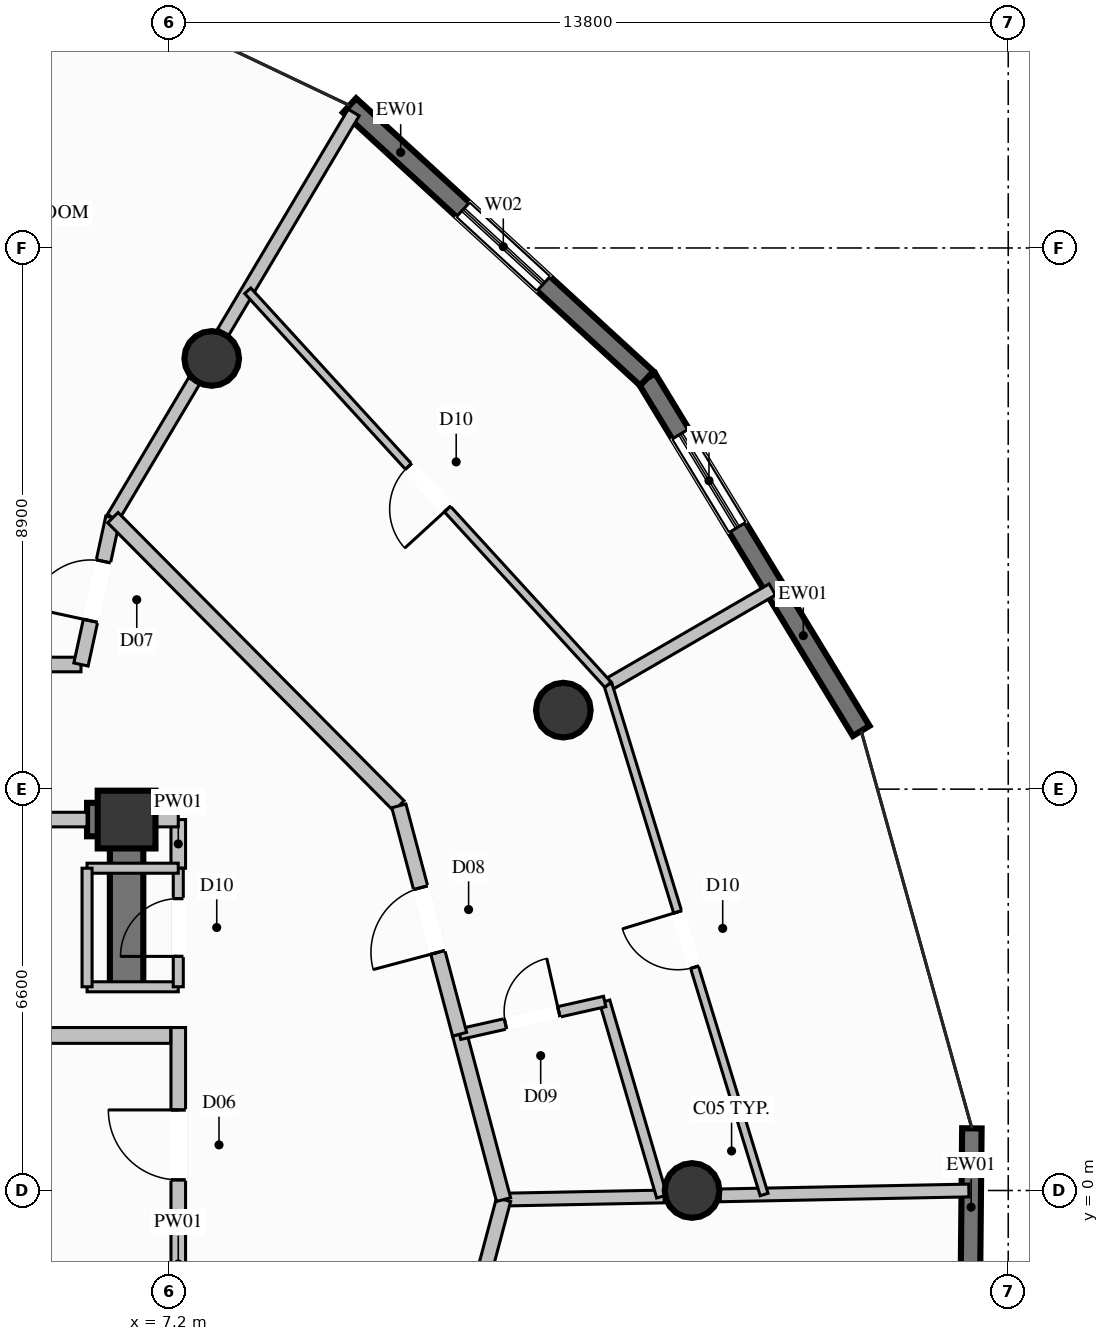
"""IFC4 building model, lengths in metres.
Left out: names, types, materials, properties, quantities, classifications, styles, units other than length and angle.
Written with IfcOpenShell. Run it as: python <this file> out.ifc"""

import sys

from ifc_helpers import new_model, si_unit, direction, frame, frame_2d, origin, origin_2d, place, context, subcontext, project, spatial, rectangle, circle, extrude, element, fill, save


model = new_model("IFC4")
c1 = context("Model", 3, precision=1e-05, world=origin(), true_north=direction((0.0, 1.0)))
c2 = subcontext(c1, "Body", "Model", "MODEL_VIEW")
j1 = project(units=[si_unit("LENGTHUNIT", "METRE"), si_unit("PLANEANGLEUNIT", "RADIAN")], contexts=[c1])
p1 = place(None, origin())
s1 = spatial("IfcSite", under=j1, at=p1, CompositionType="ELEMENT")
p2 = place(p1, origin())
s2 = spatial("IfcBuilding", under=s1, at=p2, CompositionType="ELEMENT")
p3 = place(p2, frame((0.0, 0.0, 209.2)))
s3 = spatial("IfcBuildingStorey", under=s2, at=p3, CompositionType="ELEMENT", Elevation=209.2)
p4 = place(p3, frame((6.5, 6.1, 0.0), z_axis=(0.0, 0.0, 1.0), x_axis=(1.0, 0.0, 0.0)))
e1 = element("IfcColumn", 1, at=p4, inside=s3, PredefinedType="COLUMN", context=c2, shape_type="SweptSolid", body=[
    extrude(rectangle(XDim=0.95, YDim=0.95, at=origin_2d()), origin(), (0.0, 0.0, 1.0), 3.6),
])
p5 = place(p3, frame((5.85, 6.1, 0.0), z_axis=(0.0, 0.0, 1.0), x_axis=(1.0, 0.0, 0.0)))
e2 = element("IfcWall", 2, at=p5, inside=s3, PredefinedType="SHEAR", context=c2, shape_type="SweptSolid", body=[
    extrude(rectangle(XDim=0.375, YDim=0.55, at=frame_2d((0.188, 0.0))), origin(), (0.0, 0.0, 1.0), 3.6),
])
p6 = place(p3, frame((6.5, 3.35, 0.0), z_axis=(0.0, 0.0, 1.0), x_axis=(0.0, 1.0, 0.0)))
e3 = element("IfcWall", 3, at=p6, inside=s3, PredefinedType="SHEAR", context=c2, shape_type="SweptSolid", body=[
    extrude(rectangle(XDim=3.025, YDim=0.55, at=frame_2d((1.512, 0.0))), origin(), (0.0, 0.0, 1.0), 3.6),
])
for number, where, z_axis, x_axis in (
    (4, (15.8, 0.0, 0.0), (0.0, 0.0, 1.0), (1.0, 0.0, 0.0)),
    (5, (13.683, 7.9, 0.0), (0.0, 0.0, 1.0), (1.0, 0.0, 0.0)),
    (6, (7.9, 13.683, 0.0), (0.0, 0.0, 1.0), (1.0, 0.0, 0.0)),
):
    element("IfcColumn", number, at=place(p3, frame(where, z_axis=z_axis, x_axis=x_axis)), inside=s3, PredefinedType="COLUMN", context=c2, shape_type="SweptSolid", body=[
        extrude(circle(Radius=0.45, at=origin_2d()), origin(), (0.0, 0.0, 1.0), 3.6),
    ])
p7 = place(p3, frame((20.402, 1.022, 0.0), z_axis=(0.0, 0.0, 1.0), x_axis=(-0.009674000115, -0.999953205766, 0.0)))
e7 = element("IfcWall", 7, at=p7, inside=s3, PredefinedType="SOLIDWALL", context=c2, shape_type="SweptSolid", body=[
    extrude(rectangle(XDim=6.637, YDim=0.32, at=frame_2d((3.319, 0.0))), origin(), (0.0, 0.0, 1.0), 3.36),
])
p8 = place(p7, frame((2.843, 0.0, 0.35)))
e8 = element("IfcOpeningElement", 8, at=p8, cuts=e7, PredefinedType="OPENING", context=c2, shape_type="SweptSolid", body=[
    extrude(rectangle(XDim=1.8, YDim=2.6, at=frame_2d((0.9, 1.3))), frame((0.0, 0.17, 0.0), z_axis=(0.0, -1.0, 0.0), x_axis=(1.0, 0.0, 0.0)), (0.0, 0.0, 1.0), 0.34),
])
p9 = place(p3, frame((15.055, 13.355, 0.0), z_axis=(0.0, 0.0, 1.0), x_axis=(0.519792847808, -0.854292336011, 0.0)))
e9 = element("IfcWall", 9, at=p9, inside=s3, PredefinedType="SOLIDWALL", context=c2, shape_type="SweptSolid", body=[
    extrude(rectangle(XDim=6.786, YDim=0.32, at=frame_2d((3.393, 0.0))), origin(), (0.0, 0.0, 1.0), 3.36),
])
p10 = place(p9, frame((1.069, 0.0, 0.35)))
e10 = element("IfcOpeningElement", 10, at=p10, cuts=e9, PredefinedType="OPENING", context=c2, shape_type="SweptSolid", body=[
    extrude(rectangle(XDim=1.8, YDim=2.6, at=frame_2d((0.9, 1.3))), frame((0.0, 0.17, 0.0), z_axis=(0.0, -1.0, 0.0), x_axis=(1.0, 0.0, 0.0)), (0.0, 0.0, 1.0), 0.34),
])
p11 = place(p3, frame((10.167, 17.844, 0.0), z_axis=(0.0, 0.0, 1.0), x_axis=(0.736523155924, -0.676412330452, 0.0)))
e11 = element("IfcWall", 11, at=p11, inside=s3, PredefinedType="SOLIDWALL", context=c2, shape_type="SweptSolid", body=[
    extrude(rectangle(XDim=6.636, YDim=0.32, at=frame_2d((3.318, 0.0))), origin(), (0.0, 0.0, 1.0), 3.36),
])
p12 = place(p11, frame((2.533, 0.0, 0.35)))
e12 = element("IfcOpeningElement", 12, at=p12, cuts=e11, PredefinedType="OPENING", context=c2, shape_type="SweptSolid", body=[
    extrude(rectangle(XDim=1.8, YDim=2.6, at=frame_2d((0.9, 1.3))), frame((0.0, 0.17, 0.0), z_axis=(0.0, -1.0, 0.0), x_axis=(1.0, 0.0, 0.0)), (0.0, 0.0, 1.0), 0.34),
])
p13 = place(p3, frame((7.35, -2.34, 0.0), z_axis=(0.0, 0.0, 1.0), x_axis=(0.0, 1.0, 0.0)))
e13 = element("IfcWall", 13, at=p13, inside=s3, PredefinedType="PARTITIONING", context=c2, shape_type="SweptSolid", body=[
    extrude(rectangle(XDim=5.02, YDim=0.24, at=frame_2d((2.51, 0.0))), origin(), (0.0, 0.0, 1.0), 2.445),
])
p14 = place(p13, frame((2.515, 0.0, 0.0)))
e14 = element("IfcOpeningElement", 14, at=p14, cuts=e13, PredefinedType="OPENING", context=c2, shape_type="SweptSolid", body=[
    extrude(rectangle(XDim=1.15, YDim=2.2, at=frame_2d((0.575, 1.1))), frame((0.0, 0.13, 0.0), z_axis=(0.0, -1.0, 0.0), x_axis=(1.0, 0.0, 0.0)), (0.0, 0.0, 1.0), 0.26),
])
p15 = place(p3, frame((4.13, 2.55, 0.0), z_axis=(0.0, 0.0, 1.0), x_axis=(1.0, 0.0, 0.0)))
e15 = element("IfcWall", 15, at=p15, inside=s3, PredefinedType="PARTITIONING", context=c2, shape_type="SweptSolid", body=[
    extrude(rectangle(XDim=3.095, YDim=0.26, at=frame_2d((1.548, 0.0))), origin(), (0.0, 0.0, 1.0), 3.36),
])
p16 = place(p3, frame((-5.75, 8.65, 0.0), z_axis=(0.0, 0.0, 1.0), x_axis=(1.0, 0.0, 0.0)))
e16 = element("IfcWall", 16, at=p16, inside=s3, PredefinedType="PARTITIONING", context=c2, shape_type="SweptSolid", body=[
    extrude(rectangle(XDim=11.5, YDim=0.24, at=frame_2d((5.75, 0.0))), origin(), (0.0, 0.0, 1.0), 3.36),
])
p17 = place(p3, frame((3.0, 6.1, 0.0), z_axis=(0.0, 0.0, 1.0), x_axis=(1.0, 0.0, 0.0)))
e17 = element("IfcWall", 17, at=p17, inside=s3, PredefinedType="PARTITIONING", context=c2, shape_type="SweptSolid", body=[
    extrude(rectangle(XDim=2.85, YDim=0.24, at=frame_2d((1.425, 0.0))), origin(), (0.0, 0.0, 1.0), 2.445),
])
p18 = place(p3, frame((7.35, 5.3, 0.0), z_axis=(0.0, 0.0, 1.0), x_axis=(0.0, 1.0, 0.0)))
e18 = element("IfcWall", 18, at=p18, inside=s3, PredefinedType="PARTITIONING", context=c2, shape_type="SweptSolid", body=[
    extrude(rectangle(XDim=0.8, YDim=0.24, at=frame_2d((0.4, 0.0))), origin(), (0.0, 0.0, 1.0), 2.445),
])
p19 = place(p3, frame((6.5, 6.1, 0.0), z_axis=(0.0, 0.0, 1.0), x_axis=(1.0, 0.0, 0.0)))
e19 = element("IfcWall", 19, at=p19, inside=s3, PredefinedType="PARTITIONING", context=c2, shape_type="SweptSolid", body=[
    extrude(rectangle(XDim=0.85, YDim=0.24, at=frame_2d((0.425, 0.0))), origin(), (0.0, 0.0, 1.0), 2.801),
])
p20 = place(p3, frame((5.85, 3.35, 0.0), z_axis=(0.0, 0.0, 1.0), x_axis=(1.0, 0.0, 0.0)))
e20 = element("IfcWall", 20, at=p20, inside=s3, PredefinedType="PARTITIONING", context=c2, shape_type="SweptSolid", body=[
    extrude(rectangle(XDim=1.5, YDim=0.165, at=frame_2d((0.75, 0.0))), origin(), (0.0, 0.0, 1.0), 3.36),
])
p21 = place(p3, frame((7.35, 3.35, 0.0), z_axis=(0.0, 0.0, 1.0), x_axis=(0.0, 1.0, 0.0)))
e21 = element("IfcWall", 21, at=p21, inside=s3, PredefinedType="PARTITIONING", context=c2, shape_type="SweptSolid", body=[
    extrude(rectangle(XDim=1.95, YDim=0.165, at=frame_2d((0.975, 0.0))), origin(), (0.0, 0.0, 1.0), 3.36),
])
p22 = place(p21, frame((0.5, 0.0, 0.0)))
e22 = element("IfcOpeningElement", 22, at=p22, cuts=e21, PredefinedType="OPENING", context=c2, shape_type="SweptSolid", body=[
    extrude(rectangle(XDim=0.95, YDim=2.1, at=frame_2d((0.475, 1.05))), frame((0.0, 0.093, 0.0), z_axis=(0.0, -1.0, 0.0), x_axis=(1.0, 0.0, 0.0)), (0.0, 0.0, 1.0), 0.185),
])
p23 = place(p3, frame((7.35, 5.3, 0.0), z_axis=(0.0, 0.0, 1.0), x_axis=(-1.0, 0.0, 0.0)))
e23 = element("IfcWall", 23, at=p23, inside=s3, PredefinedType="PARTITIONING", context=c2, shape_type="SweptSolid", body=[
    extrude(rectangle(XDim=1.5, YDim=0.165, at=frame_2d((0.75, 0.0))), origin(), (0.0, 0.0, 1.0), 2.445),
])
p24 = place(p3, frame((5.85, 5.3, 0.0), z_axis=(0.0, 0.0, 1.0), x_axis=(0.0, -1.0, 0.0)))
e24 = element("IfcWall", 24, at=p24, inside=s3, PredefinedType="PARTITIONING", context=c2, shape_type="SweptSolid", body=[
    extrude(rectangle(XDim=1.95, YDim=0.165, at=frame_2d((0.975, 0.0))), origin(), (0.0, 0.0, 1.0), 2.445),
])
p25 = place(p3, frame((12.7, -0.15, 0.0), z_axis=(0.0, 0.0, 1.0), x_axis=(0.999806076636, 0.019692869828, 0.0)))
e25 = element("IfcWall", 25, at=p25, inside=s3, PredefinedType="PARTITIONING", context=c2, shape_type="SweptSolid", body=[
    extrude(rectangle(XDim=2.641, YDim=0.21, at=frame_2d((1.32, 0.0))), origin(), (0.0, 0.0, 1.0), 3.36),
])
p26 = place(p3, frame((16.263, -0.08, 0.0), z_axis=(0.0, 0.0, 1.0), x_axis=(0.999808303125, 0.019579504653, 0.0)))
e26 = element("IfcWall", 26, at=p26, inside=s3, PredefinedType="PARTITIONING", context=c2, shape_type="SweptSolid", body=[
    extrude(rectangle(XDim=4.09, YDim=0.21, at=frame_2d((2.045, 0.0))), origin(), (0.0, 0.0, 1.0), 3.36),
])
p27 = place(p3, frame((6.275, 11.065, 0.0), z_axis=(0.0, 0.0, 1.0), x_axis=(0.510935579326, 0.859619005013, 0.0)))
e27 = element("IfcWall", 27, at=p27, inside=s3, PredefinedType="PARTITIONING", context=c2, shape_type="SweptSolid", body=[
    extrude(rectangle(XDim=2.615, YDim=0.21, at=frame_2d((1.308, 0.0))), origin(), (0.0, 0.0, 1.0), 2.801),
])
p28 = place(p3, frame((8.087, 14.114, 0.0), z_axis=(0.0, 0.0, 1.0), x_axis=(0.510955957876, 0.859606892196, 0.0)))
e28 = element("IfcWall", 28, at=p28, inside=s3, PredefinedType="PARTITIONING", context=c2, shape_type="SweptSolid", body=[
    extrude(rectangle(XDim=4.204, YDim=0.21, at=frame_2d((2.102, 0.0))), origin(), (0.0, 0.0, 1.0), 3.36),
])
p29 = place(p3, frame((5.75, 8.65, 0.0), z_axis=(0.0, 0.0, 1.0), x_axis=(0.212388632151, 0.977185278713, 0.0)))
e29 = element("IfcWall", 29, at=p29, inside=s3, PredefinedType="PARTITIONING", context=c2, shape_type="SweptSolid", body=[
    extrude(rectangle(XDim=2.471, YDim=0.24, at=frame_2d((1.236, 0.0))), origin(), (0.0, 0.0, 1.0), 3.36),
])
p30 = place(p29, frame((0.736, 0.0, 0.0)))
e30 = element("IfcOpeningElement", 30, at=p30, cuts=e29, PredefinedType="OPENING", context=c2, shape_type="SweptSolid", body=[
    extrude(rectangle(XDim=1.0, YDim=2.2, at=frame_2d((0.5, 1.1))), frame((0.0, 0.13, 0.0), z_axis=(0.0, -1.0, 0.0), x_axis=(1.0, 0.0, 0.0)), (0.0, 0.0, 1.0), 0.26),
])
p31 = place(p3, frame((11.701, -3.906, 0.0), z_axis=(0.0, 0.0, 1.0), x_axis=(0.257037057674, 0.966401547486, 0.0)))
e31 = element("IfcWall", 31, at=p31, inside=s3, PredefinedType="PARTITIONING", context=c2, shape_type="SweptSolid", body=[
    extrude(rectangle(XDim=3.887, YDim=0.24, at=frame_2d((1.943, 0.0))), origin(), (0.0, 0.0, 1.0), 3.36),
])
p32 = place(p31, frame((1.443, 0.0, 0.0)))
e32 = element("IfcOpeningElement", 32, at=p32, cuts=e31, PredefinedType="OPENING", context=c2, shape_type="SweptSolid", body=[
    extrude(rectangle(XDim=1.0, YDim=2.2, at=frame_2d((0.5, 1.1))), frame((0.0, 0.13, 0.0), z_axis=(0.0, -1.0, 0.0), x_axis=(1.0, 0.0, 0.0)), (0.0, 0.0, 1.0), 0.26),
])
p33 = place(p3, frame((12.7, -0.15, 0.0), z_axis=(0.0, 0.0, 1.0), x_axis=(-0.256858081143, 0.966449132729, 0.0)))
e33 = element("IfcWall", 33, at=p33, inside=s3, PredefinedType="PARTITIONING", context=c2, shape_type="SweptSolid", body=[
    extrude(rectangle(XDim=2.814, YDim=0.24, at=frame_2d((1.407, 0.0))), origin(), (0.0, 0.0, 1.0), 3.36),
])
p34 = place(p3, frame((15.302, -0.099, 0.0), z_axis=(0.0, 0.0, 1.0), x_axis=(-0.280987384428, 0.959711461739, 0.0)))
e34 = element("IfcWall", 34, at=p34, inside=s3, PredefinedType="PLUMBINGWALL", context=c2, shape_type="SweptSolid", body=[
    extrude(rectangle(XDim=3.342, YDim=0.175, at=frame_2d((1.671, 0.0))), origin(), (0.0, 0.0, 1.0), 2.929),
])
p35 = place(p3, frame((11.977, 2.57, 0.0), z_axis=(0.0, 0.0, 1.0), x_axis=(0.975522568514, 0.219899336789, 0.0)))
e35 = element("IfcWall", 35, at=p35, inside=s3, PredefinedType="PLUMBINGWALL", context=c2, shape_type="SweptSolid", body=[
    extrude(rectangle(XDim=2.446, YDim=0.175, at=frame_2d((1.223, 0.0))), origin(), (0.0, 0.0, 1.0), 3.36),
])
p36 = place(p35, frame((0.773, 0.0, 0.0)))
e36 = element("IfcOpeningElement", 36, at=p36, cuts=e35, PredefinedType="OPENING", context=c2, shape_type="SweptSolid", body=[
    extrude(rectangle(XDim=0.9, YDim=2.1, at=frame_2d((0.45, 1.05))), frame((0.0, 0.098, 0.0), z_axis=(0.0, -1.0, 0.0), x_axis=(1.0, 0.0, 0.0)), (0.0, 0.0, 1.0), 0.195),
])
p37 = place(p3, frame((14.418, 8.318, 0.0), z_axis=(0.0, 0.0, 1.0), x_axis=(0.865215694167, 0.501399843006, 0.0)))
e37 = element("IfcWall", 37, at=p37, inside=s3, PredefinedType="PARTITIONING", context=c2, shape_type="SweptSolid", body=[
    extrude(rectangle(XDim=3.123, YDim=0.21, at=frame_2d((1.562, 0.0))), origin(), (0.0, 0.0, 1.0), 3.36),
])
p38 = place(p3, frame((10.978, 6.325, 0.0), z_axis=(0.0, 0.0, 1.0), x_axis=(-0.704340920508, 0.709861865223, 0.0)))
e38 = element("IfcWall", 38, at=p38, inside=s3, PredefinedType="PARTITIONING", context=c2, shape_type="SweptSolid", body=[
    extrude(rectangle(XDim=6.677, YDim=0.24, at=frame_2d((3.339, 0.0))), origin(), (0.0, 0.0, 1.0), 3.36),
])
p39 = place(p3, frame((11.977, 2.57, 0.0), z_axis=(0.0, 0.0, 1.0), x_axis=(-0.257115096486, 0.966380787867, 0.0)))
e39 = element("IfcWall", 39, at=p39, inside=s3, PredefinedType="PARTITIONING", context=c2, shape_type="SweptSolid", body=[
    extrude(rectangle(XDim=3.885, YDim=0.24, at=frame_2d((1.943, 0.0))), origin(), (0.0, 0.0, 1.0), 3.36),
])
p40 = place(p39, frame((1.393, 0.0, 0.0)))
e40 = element("IfcOpeningElement", 40, at=p40, cuts=e39, PredefinedType="OPENING", context=c2, shape_type="SweptSolid", body=[
    extrude(rectangle(XDim=1.1, YDim=2.3, at=frame_2d((0.55, 1.15))), frame((0.0, 0.13, 0.0), z_axis=(0.0, -1.0, 0.0), x_axis=(1.0, 0.0, 0.0)), (0.0, 0.0, 1.0), 0.26),
])
p41 = place(p3, frame((16.985, -0.066, 0.0), z_axis=(0.0, 0.0, 1.0), x_axis=(-0.292776617633, 0.956180867915, 0.0)))
e41 = element("IfcWall", 41, at=p41, inside=s3, PredefinedType="PARTITIONING", context=c2, shape_type="SweptSolid", body=[
    extrude(rectangle(XDim=8.768, YDim=0.135, at=frame_2d((4.384, 0.0))), origin(), (0.0, 0.0, 1.0), 3.36),
])
p42 = place(p41, frame((3.909, 0.0, 0.0)))
e42 = element("IfcOpeningElement", 42, at=p42, cuts=e41, PredefinedType="OPENING", context=c2, shape_type="SweptSolid", body=[
    extrude(rectangle(XDim=0.95, YDim=2.1, at=frame_2d((0.475, 1.05))), frame((0.0, 0.078, 0.0), z_axis=(0.0, -1.0, 0.0), x_axis=(1.0, 0.0, 0.0)), (0.0, 0.0, 1.0), 0.155),
])
p43 = place(p3, frame((14.418, 8.318, 0.0), z_axis=(0.0, 0.0, 1.0), x_axis=(-0.674924557891, 0.73788674006, 0.0)))
e43 = element("IfcWall", 43, at=p43, inside=s3, PredefinedType="PARTITIONING", context=c2, shape_type="SweptSolid", body=[
    extrude(rectangle(XDim=8.779, YDim=0.135, at=frame_2d((4.389, 0.0))), origin(), (0.0, 0.0, 1.0), 3.36),
])
p44 = place(p43, frame((3.914, 0.0, 0.0)))
e44 = element("IfcOpeningElement", 44, at=p44, cuts=e43, PredefinedType="OPENING", context=c2, shape_type="SweptSolid", body=[
    extrude(rectangle(XDim=0.95, YDim=2.1, at=frame_2d((0.475, 1.05))), frame((0.0, 0.078, 0.0), z_axis=(0.0, -1.0, 0.0), x_axis=(1.0, 0.0, 0.0)), (0.0, 0.0, 1.0), 0.155),
])
p45 = place(p10, origin())
e45 = element("IfcWindow", 45, at=p45, inside=s3, PartitioningType="SINGLE_PANEL", PredefinedType="WINDOW", context=c2, shape_type="SweptSolid", body=[
    extrude(rectangle(XDim=1.8, YDim=2.6, at=frame_2d((0.9, 1.3))), frame((0.0, 0.03, 0.0), z_axis=(0.0, -1.0, 0.0), x_axis=(1.0, 0.0, 0.0)), (0.0, 0.0, 1.0), 0.06),
])
fill(e10, e45)
p46 = place(p12, origin())
e46 = element("IfcWindow", 46, at=p46, inside=s3, PartitioningType="SINGLE_PANEL", PredefinedType="WINDOW", context=c2, shape_type="SweptSolid", body=[
    extrude(rectangle(XDim=1.8, YDim=2.6, at=frame_2d((0.9, 1.3))), frame((0.0, 0.03, 0.0), z_axis=(0.0, -1.0, 0.0), x_axis=(1.0, 0.0, 0.0)), (0.0, 0.0, 1.0), 0.06),
])
fill(e12, e46)
p47 = place(p14, origin())
e47 = element("IfcDoor", 47, at=p47, inside=s3, OperationType="SINGLE_SWING_RIGHT", PredefinedType="DOOR", context=c2, shape_type="SweptSolid", body=[
    extrude(rectangle(XDim=1.15, YDim=2.2, at=frame_2d((0.575, 1.1))), frame((0.0, 0.025, 0.0), z_axis=(0.0, -1.0, 0.0), x_axis=(1.0, 0.0, 0.0)), (0.0, 0.0, 1.0), 0.05),
])
fill(e14, e47)
p48 = place(p22, origin())
e48 = element("IfcDoor", 48, at=p48, inside=s3, OperationType="SINGLE_SWING_LEFT", PredefinedType="DOOR", context=c2, shape_type="SweptSolid", body=[
    extrude(rectangle(XDim=0.95, YDim=2.1, at=frame_2d((0.475, 1.05))), frame((0.0, 0.025, 0.0), z_axis=(0.0, -1.0, 0.0), x_axis=(1.0, 0.0, 0.0)), (0.0, 0.0, 1.0), 0.05),
])
fill(e22, e48)
p49 = place(p30, origin())
e49 = element("IfcDoor", 49, at=p49, inside=s3, OperationType="SINGLE_SWING_LEFT", PredefinedType="DOOR", context=c2, shape_type="SweptSolid", body=[
    extrude(rectangle(XDim=1.0, YDim=2.2, at=frame_2d((0.5, 1.1))), frame((0.0, 0.025, 0.0), z_axis=(0.0, -1.0, 0.0), x_axis=(1.0, 0.0, 0.0)), (0.0, 0.0, 1.0), 0.05),
])
fill(e30, e49)
p50 = place(p36, origin())
e50 = element("IfcDoor", 50, at=p50, inside=s3, OperationType="SINGLE_SWING_RIGHT", PredefinedType="DOOR", context=c2, shape_type="SweptSolid", body=[
    extrude(rectangle(XDim=0.9, YDim=2.1, at=frame_2d((0.45, 1.05))), frame((0.0, 0.025, 0.0), z_axis=(0.0, -1.0, 0.0), x_axis=(1.0, 0.0, 0.0)), (0.0, 0.0, 1.0), 0.05),
])
fill(e36, e50)
p51 = place(p40, origin())
e51 = element("IfcDoor", 51, at=p51, inside=s3, OperationType="SINGLE_SWING_LEFT", PredefinedType="DOOR", context=c2, shape_type="SweptSolid", body=[
    extrude(rectangle(XDim=1.1, YDim=2.3, at=frame_2d((0.55, 1.15))), frame((0.0, 0.025, 0.0), z_axis=(0.0, -1.0, 0.0), x_axis=(1.0, 0.0, 0.0)), (0.0, 0.0, 1.0), 0.05),
])
fill(e40, e51)
p52 = place(p42, origin())
e52 = element("IfcDoor", 52, at=p52, inside=s3, OperationType="SINGLE_SWING_RIGHT", PredefinedType="DOOR", context=c2, shape_type="SweptSolid", body=[
    extrude(rectangle(XDim=0.95, YDim=2.1, at=frame_2d((0.475, 1.05))), frame((0.0, 0.025, 0.0), z_axis=(0.0, -1.0, 0.0), x_axis=(1.0, 0.0, 0.0)), (0.0, 0.0, 1.0), 0.05),
])
fill(e42, e52)
p53 = place(p44, origin())
e53 = element("IfcDoor", 53, at=p53, inside=s3, OperationType="SINGLE_SWING_LEFT", PredefinedType="DOOR", context=c2, shape_type="SweptSolid", body=[
    extrude(rectangle(XDim=0.95, YDim=2.1, at=frame_2d((0.475, 1.05))), frame((0.0, 0.025, 0.0), z_axis=(0.0, -1.0, 0.0), x_axis=(1.0, 0.0, 0.0)), (0.0, 0.0, 1.0), 0.05),
])
fill(e44, e53)
save(model, sys.argv[1])
